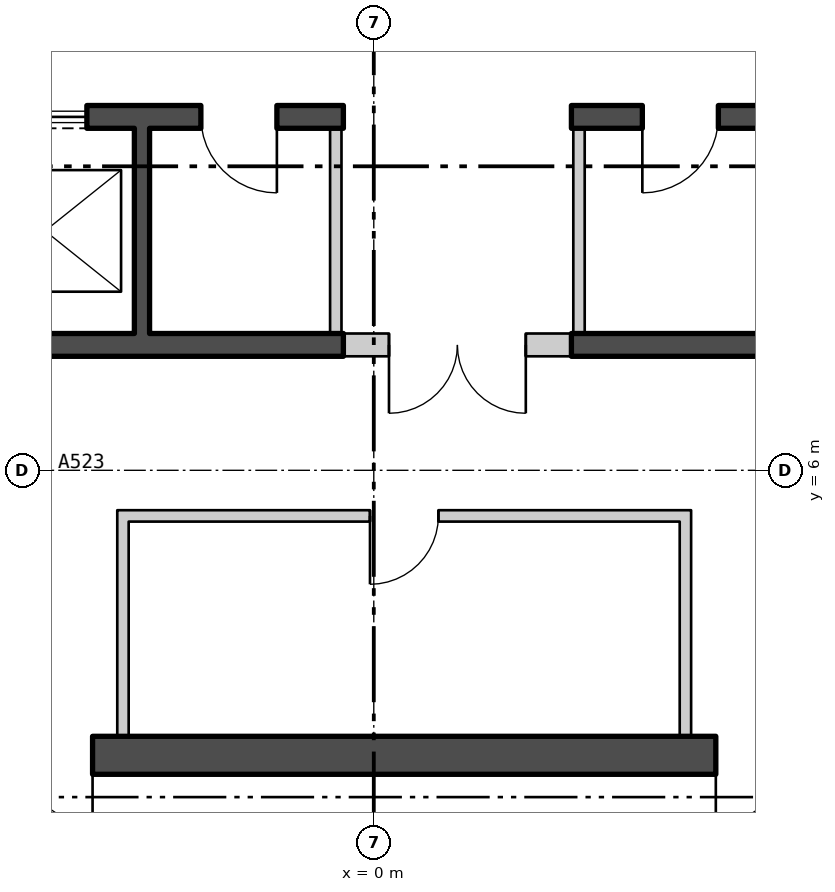
"""IFC4 building model, lengths in metres.
Left out: names, types, materials, properties, quantities, classifications, styles, units other than length and angle.
Written with IfcOpenShell. Run it as: python <this file> out.ifc"""

import sys

from ifc_helpers import new_model, si_unit, direction, frame, frame_2d, origin, place, context, subcontext, project, spatial, polyline, rectangle, outline, extrude, element, fill, save


model = new_model("IFC4")
c1 = context("Model", 3, precision=1e-05, world=origin(), true_north=direction((0.0, 1.0)))
c2 = subcontext(c1, "Body", "Model", "MODEL_VIEW")
j1 = project(units=[si_unit("LENGTHUNIT", "METRE"), si_unit("PLANEANGLEUNIT", "RADIAN")], contexts=[c1])
p1 = place(None, origin())
s1 = spatial("IfcSite", under=j1, at=p1, CompositionType="ELEMENT")
p2 = place(p1, origin())
s2 = spatial("IfcBuilding", under=s1, at=p2, CompositionType="ELEMENT")
p3 = place(p2, frame((0.0, 0.0, 174.9)))
s3 = spatial("IfcBuildingStorey", under=s2, at=p3, CompositionType="ELEMENT", Elevation=174.9)
p4 = place(p3, frame((-26.775, 13.22, -0.18), z_axis=(0.0, 0.0, 1.0), x_axis=(0.500000335318, -0.866025210188, 0.0)))
e1 = element("IfcWall", 1, at=p4, inside=s3, PredefinedType="SOLIDWALL", context=c2, shape_type="SweptSolid", body=[
    extrude(outline(polyline([(-0.13, -0.225), (45.88, -0.225), (45.62, 0.225), (0.13, 0.225), (-0.13, -0.225)])), origin(), (0.0, 0.0, 1.0), 3.68),
])
p5 = place(p4, frame((1.425, 0.0, 1.08)))
e2 = element("IfcOpeningElement", 2, at=p5, cuts=e1, PredefinedType="OPENING", context=c2, shape_type="SweptSolid", body=[
    extrude(rectangle(XDim=2.4, YDim=2.0, at=frame_2d((1.2, 1.0))), frame((0.0, 0.235, 0.0), z_axis=(0.0, -1.0, 0.0), x_axis=(1.0, 0.0, 0.0)), (0.0, 0.0, 1.0), 0.47),
])
p6 = place(p4, frame((5.895, 0.0, 1.08)))
e3 = element("IfcOpeningElement", 3, at=p6, cuts=e1, PredefinedType="OPENING", context=c2, shape_type="SweptSolid", body=[
    extrude(rectangle(XDim=2.4, YDim=2.0, at=frame_2d((1.2, 1.0))), frame((0.0, 0.235, 0.0), z_axis=(0.0, -1.0, 0.0), x_axis=(1.0, 0.0, 0.0)), (0.0, 0.0, 1.0), 0.47),
])
p7 = place(p4, frame((10.403, 0.0, 1.08)))
e4 = element("IfcOpeningElement", 4, at=p7, cuts=e1, PredefinedType="OPENING", context=c2, shape_type="SweptSolid", body=[
    extrude(rectangle(XDim=2.4, YDim=2.0, at=frame_2d((1.2, 1.0))), frame((0.0, 0.235, 0.0), z_axis=(0.0, -1.0, 0.0), x_axis=(1.0, 0.0, 0.0)), (0.0, 0.0, 1.0), 0.47),
])
p8 = place(p4, frame((14.912, 0.0, 1.08)))
e5 = element("IfcOpeningElement", 5, at=p8, cuts=e1, PredefinedType="OPENING", context=c2, shape_type="SweptSolid", body=[
    extrude(rectangle(XDim=2.4, YDim=2.0, at=frame_2d((1.2, 1.0))), frame((0.0, 0.235, 0.0), z_axis=(0.0, -1.0, 0.0), x_axis=(1.0, 0.0, 0.0)), (0.0, 0.0, 1.0), 0.47),
])
p9 = place(p4, frame((19.421, 0.0, 1.08)))
e6 = element("IfcOpeningElement", 6, at=p9, cuts=e1, PredefinedType="OPENING", context=c2, shape_type="SweptSolid", body=[
    extrude(rectangle(XDim=2.4, YDim=2.0, at=frame_2d((1.2, 1.0))), frame((0.0, 0.235, 0.0), z_axis=(0.0, -1.0, 0.0), x_axis=(1.0, 0.0, 0.0)), (0.0, 0.0, 1.0), 0.47),
])
p10 = place(p4, frame((23.929, 0.0, 1.08)))
e7 = element("IfcOpeningElement", 7, at=p10, cuts=e1, PredefinedType="OPENING", context=c2, shape_type="SweptSolid", body=[
    extrude(rectangle(XDim=2.4, YDim=2.0, at=frame_2d((1.2, 1.0))), frame((0.0, 0.235, 0.0), z_axis=(0.0, -1.0, 0.0), x_axis=(1.0, 0.0, 0.0)), (0.0, 0.0, 1.0), 0.47),
])
p11 = place(p4, frame((28.438, 0.0, 1.08)))
e8 = element("IfcOpeningElement", 8, at=p11, cuts=e1, PredefinedType="OPENING", context=c2, shape_type="SweptSolid", body=[
    extrude(rectangle(XDim=2.4, YDim=2.0, at=frame_2d((1.2, 1.0))), frame((0.0, 0.235, 0.0), z_axis=(0.0, -1.0, 0.0), x_axis=(1.0, 0.0, 0.0)), (0.0, 0.0, 1.0), 0.47),
])
p12 = place(p4, frame((32.947, 0.0, 1.08)))
e9 = element("IfcOpeningElement", 9, at=p12, cuts=e1, PredefinedType="OPENING", context=c2, shape_type="SweptSolid", body=[
    extrude(rectangle(XDim=2.4, YDim=2.0, at=frame_2d((1.2, 1.0))), frame((0.0, 0.235, 0.0), z_axis=(0.0, -1.0, 0.0), x_axis=(1.0, 0.0, 0.0)), (0.0, 0.0, 1.0), 0.47),
])
p13 = place(p4, frame((37.455, 0.0, 1.08)))
e10 = element("IfcOpeningElement", 10, at=p13, cuts=e1, PredefinedType="OPENING", context=c2, shape_type="SweptSolid", body=[
    extrude(rectangle(XDim=2.4, YDim=2.0, at=frame_2d((1.2, 1.0))), frame((0.0, 0.235, 0.0), z_axis=(0.0, -1.0, 0.0), x_axis=(1.0, 0.0, 0.0)), (0.0, 0.0, 1.0), 0.47),
])
p14 = place(p4, frame((41.925, 0.0, 1.08)))
e11 = element("IfcOpeningElement", 11, at=p14, cuts=e1, PredefinedType="OPENING", context=c2, shape_type="SweptSolid", body=[
    extrude(rectangle(XDim=2.4, YDim=2.0, at=frame_2d((1.2, 1.0))), frame((0.0, 0.235, 0.0), z_axis=(0.0, -1.0, 0.0), x_axis=(1.0, 0.0, 0.0)), (0.0, 0.0, 1.0), 0.47),
])
p15 = place(p3, frame((3.9, -26.401, -0.18), z_axis=(0.0, 0.0, 1.0), x_axis=(0.500000335318, 0.866025210188, 0.0)))
e12 = element("IfcWall", 12, at=p15, inside=s3, PredefinedType="SOLIDWALL", context=c2, shape_type="SweptSolid", body=[
    extrude(outline(polyline([(-0.13, -0.225), (45.88, -0.225), (45.62, 0.225), (0.13, 0.225), (-0.13, -0.225)])), origin(), (0.0, 0.0, 1.0), 3.68),
])
p16 = place(p15, frame((1.425, 0.0, 1.08)))
e13 = element("IfcOpeningElement", 13, at=p16, cuts=e12, PredefinedType="OPENING", context=c2, shape_type="SweptSolid", body=[
    extrude(rectangle(XDim=2.4, YDim=2.0, at=frame_2d((1.2, 1.0))), frame((0.0, 0.235, 0.0), z_axis=(0.0, -1.0, 0.0), x_axis=(1.0, 0.0, 0.0)), (0.0, 0.0, 1.0), 0.47),
])
p17 = place(p15, frame((5.895, 0.0, 1.08)))
e14 = element("IfcOpeningElement", 14, at=p17, cuts=e12, PredefinedType="OPENING", context=c2, shape_type="SweptSolid", body=[
    extrude(rectangle(XDim=2.4, YDim=2.0, at=frame_2d((1.2, 1.0))), frame((0.0, 0.235, 0.0), z_axis=(0.0, -1.0, 0.0), x_axis=(1.0, 0.0, 0.0)), (0.0, 0.0, 1.0), 0.47),
])
p18 = place(p15, frame((10.403, 0.0, 1.08)))
e15 = element("IfcOpeningElement", 15, at=p18, cuts=e12, PredefinedType="OPENING", context=c2, shape_type="SweptSolid", body=[
    extrude(rectangle(XDim=2.4, YDim=2.0, at=frame_2d((1.2, 1.0))), frame((0.0, 0.235, 0.0), z_axis=(0.0, -1.0, 0.0), x_axis=(1.0, 0.0, 0.0)), (0.0, 0.0, 1.0), 0.47),
])
p19 = place(p15, frame((14.912, 0.0, 1.08)))
e16 = element("IfcOpeningElement", 16, at=p19, cuts=e12, PredefinedType="OPENING", context=c2, shape_type="SweptSolid", body=[
    extrude(rectangle(XDim=2.4, YDim=2.0, at=frame_2d((1.2, 1.0))), frame((0.0, 0.235, 0.0), z_axis=(0.0, -1.0, 0.0), x_axis=(1.0, 0.0, 0.0)), (0.0, 0.0, 1.0), 0.47),
])
p20 = place(p15, frame((19.421, 0.0, 1.08)))
e17 = element("IfcOpeningElement", 17, at=p20, cuts=e12, PredefinedType="OPENING", context=c2, shape_type="SweptSolid", body=[
    extrude(rectangle(XDim=2.4, YDim=2.0, at=frame_2d((1.2, 1.0))), frame((0.0, 0.235, 0.0), z_axis=(0.0, -1.0, 0.0), x_axis=(1.0, 0.0, 0.0)), (0.0, 0.0, 1.0), 0.47),
])
p21 = place(p15, frame((23.929, 0.0, 1.08)))
e18 = element("IfcOpeningElement", 18, at=p21, cuts=e12, PredefinedType="OPENING", context=c2, shape_type="SweptSolid", body=[
    extrude(rectangle(XDim=2.4, YDim=2.0, at=frame_2d((1.2, 1.0))), frame((0.0, 0.235, 0.0), z_axis=(0.0, -1.0, 0.0), x_axis=(1.0, 0.0, 0.0)), (0.0, 0.0, 1.0), 0.47),
])
p22 = place(p15, frame((37.455, 0.0, 1.08)))
e19 = element("IfcOpeningElement", 19, at=p22, cuts=e12, PredefinedType="OPENING", context=c2, shape_type="SweptSolid", body=[
    extrude(rectangle(XDim=2.4, YDim=2.0, at=frame_2d((1.2, 1.0))), frame((0.0, 0.235, 0.0), z_axis=(0.0, -1.0, 0.0), x_axis=(1.0, 0.0, 0.0)), (0.0, 0.0, 1.0), 0.47),
])
p23 = place(p15, frame((41.925, 0.0, 1.08)))
e20 = element("IfcOpeningElement", 20, at=p23, cuts=e12, PredefinedType="OPENING", context=c2, shape_type="SweptSolid", body=[
    extrude(rectangle(XDim=2.4, YDim=2.0, at=frame_2d((1.2, 1.0))), frame((0.0, 0.235, 0.0), z_axis=(0.0, -1.0, 0.0), x_axis=(1.0, 0.0, 0.0)), (0.0, 0.0, 1.0), 0.47),
])
p24 = place(p3, frame((-16.2, 2.25, 0.0), z_axis=(0.0, 0.0, 1.0), x_axis=(1.0, 0.0, 0.0)))
e21 = element("IfcWall", 21, at=p24, inside=s3, PredefinedType="SHEAR", context=c2, shape_type="SweptSolid", body=[
    extrude(rectangle(XDim=32.4, YDim=0.5, at=frame_2d((16.2, 0.0))), origin(), (0.0, 0.0, 1.0), 3.7),
])
p25 = place(p24, frame((10.7, 0.0, 0.0)))
e22 = element("IfcOpeningElement", 22, at=p25, cuts=e21, PredefinedType="OPENING", context=c2, shape_type="SweptSolid", body=[
    extrude(rectangle(XDim=1.8, YDim=2.4, at=frame_2d((0.9, 1.2))), frame((0.0, 0.26, 0.0), z_axis=(0.0, -1.0, 0.0), x_axis=(1.0, 0.0, 0.0)), (0.0, 0.0, 1.0), 0.52),
])
p26 = place(p24, frame((20.7, 0.0, 0.0)))
e23 = element("IfcOpeningElement", 23, at=p26, cuts=e21, PredefinedType="OPENING", context=c2, shape_type="SweptSolid", body=[
    extrude(rectangle(XDim=1.8, YDim=2.4, at=frame_2d((0.9, 1.2))), frame((0.0, 0.26, 0.0), z_axis=(0.0, -1.0, 0.0), x_axis=(1.0, 0.0, 0.0)), (0.0, 0.0, 1.0), 0.52),
])
p27 = place(p3, frame((-10.7, 10.65, 0.0), z_axis=(0.0, 0.0, 1.0), x_axis=(1.0, 0.0, 0.0)))
e24 = element("IfcWall", 24, at=p27, inside=s3, PredefinedType="SHEAR", context=c2, shape_type="SweptSolid", body=[
    extrude(rectangle(XDim=10.3, YDim=0.3, at=frame_2d((5.15, 0.0))), origin(), (0.0, 0.0, 1.0), 3.7),
])
p28 = place(p27, frame((0.675, 0.0, 0.0)))
e25 = element("IfcOpeningElement", 25, at=p28, cuts=e24, PredefinedType="OPENING", context=c2, shape_type="SweptSolid", body=[
    extrude(rectangle(XDim=1.1, YDim=2.1, at=frame_2d((0.55, 1.05))), frame((0.0, 0.16, 0.0), z_axis=(0.0, -1.0, 0.0), x_axis=(1.0, 0.0, 0.0)), (0.0, 0.0, 1.0), 0.32),
])
p29 = place(p27, frame((3.275, 0.0, 0.0)))
e26 = element("IfcOpeningElement", 26, at=p29, cuts=e24, PredefinedType="OPENING", context=c2, shape_type="SweptSolid", body=[
    extrude(rectangle(XDim=1.1, YDim=2.1, at=frame_2d((0.55, 1.05))), frame((0.0, 0.16, 0.0), z_axis=(0.0, -1.0, 0.0), x_axis=(1.0, 0.0, 0.0)), (0.0, 0.0, 1.0), 0.32),
])
p30 = place(p27, frame((5.825, 0.0, 0.0)))
e27 = element("IfcOpeningElement", 27, at=p30, cuts=e24, PredefinedType="OPENING", context=c2, shape_type="SweptSolid", body=[
    extrude(rectangle(XDim=1.1, YDim=2.1, at=frame_2d((0.55, 1.05))), frame((0.0, 0.16, 0.0), z_axis=(0.0, -1.0, 0.0), x_axis=(1.0, 0.0, 0.0)), (0.0, 0.0, 1.0), 0.32),
])
p31 = place(p27, frame((8.425, 0.0, 0.0)))
e28 = element("IfcOpeningElement", 28, at=p31, cuts=e24, PredefinedType="OPENING", context=c2, shape_type="SweptSolid", body=[
    extrude(rectangle(XDim=1.0, YDim=2.1, at=frame_2d((0.5, 1.05))), frame((0.0, 0.16, 0.0), z_axis=(0.0, -1.0, 0.0), x_axis=(1.0, 0.0, 0.0)), (0.0, 0.0, 1.0), 0.32),
])
p32 = place(p3, frame((-10.7, 7.65, 0.0), z_axis=(0.0, 0.0, 1.0), x_axis=(1.0, 0.0, 0.0)))
e29 = element("IfcWall", 29, at=p32, inside=s3, PredefinedType="SHEAR", context=c2, shape_type="SweptSolid", body=[
    extrude(rectangle(XDim=10.3, YDim=0.3, at=frame_2d((5.15, 0.0))), origin(), (0.0, 0.0, 1.0), 3.7),
])
p33 = place(p3, frame((2.6, 10.65, 0.0), z_axis=(0.0, 0.0, 1.0), x_axis=(1.0, 0.0, 0.0)))
e30 = element("IfcWall", 30, at=p33, inside=s3, PredefinedType="SHEAR", context=c2, shape_type="SweptSolid", body=[
    extrude(rectangle(XDim=8.1, YDim=0.3, at=frame_2d((4.05, 0.0))), origin(), (0.0, 0.0, 1.0), 3.7),
])
p34 = place(p33, frame((0.933, 0.0, 0.0)))
e31 = element("IfcOpeningElement", 31, at=p34, cuts=e30, PredefinedType="OPENING", context=c2, shape_type="SweptSolid", body=[
    extrude(rectangle(XDim=1.0, YDim=2.1, at=frame_2d((0.5, 1.05))), frame((0.0, 0.16, 0.0), z_axis=(0.0, -1.0, 0.0), x_axis=(1.0, 0.0, 0.0)), (0.0, 0.0, 1.0), 0.32),
])
p35 = place(p3, frame((2.6, 7.65, 0.0), z_axis=(0.0, 0.0, 1.0), x_axis=(1.0, 0.0, 0.0)))
e32 = element("IfcWall", 32, at=p35, inside=s3, PredefinedType="SHEAR", context=c2, shape_type="SweptSolid", body=[
    extrude(rectangle(XDim=8.1, YDim=0.3, at=frame_2d((4.05, 0.0))), origin(), (0.0, 0.0, 1.0), 3.7),
])
p36 = place(p3, frame((-3.05, 7.8, 0.0), z_axis=(0.0, 0.0, 1.0), x_axis=(0.0, 1.0, 0.0)))
e33 = element("IfcWall", 33, at=p36, inside=s3, PredefinedType="SHEAR", context=c2, shape_type="SweptSolid", body=[
    extrude(rectangle(XDim=2.7, YDim=0.2, at=frame_2d((1.35, 0.0))), origin(), (0.0, 0.0, 1.0), 3.7),
])
for number, where, z_axis, x_axis in (
    (34, (-0.5, 7.8, 0.0), (0.0, 0.0, 1.0), (0.0, 1.0, 0.0)),
    (35, (2.7, 7.8, 0.0), (0.0, 0.0, 1.0), (0.0, 1.0, 0.0)),
):
    element("IfcWall", number, at=place(p3, frame(where, z_axis=z_axis, x_axis=x_axis)), inside=s3, PredefinedType="PARTITIONING", context=c2, shape_type="SweptSolid", body=[
        extrude(rectangle(XDim=2.7, YDim=0.15, at=frame_2d((1.35, 0.0))), origin(), (0.0, 0.0, 1.0), 3.7),
    ])
for number, where, z_axis, x_axis in (
    (36, (-3.3, 2.5, 0.0), (0.0, 0.0, 1.0), (0.0, 1.0, 0.0)),
    (37, (4.1, 2.5, 0.0), (0.0, 0.0, 1.0), (0.0, 1.0, 0.0)),
):
    element("IfcWall", number, at=place(p3, frame(where, z_axis=z_axis, x_axis=x_axis)), inside=s3, PredefinedType="PARTITIONING", context=c2, shape_type="SweptSolid", body=[
        extrude(rectangle(XDim=2.975, YDim=0.15, at=frame_2d((1.488, 0.0))), origin(), (0.0, 0.0, 1.0), 3.7),
    ])
p37 = place(p3, frame((-3.225, 5.4, 0.0), z_axis=(0.0, 0.0, 1.0), x_axis=(1.0, 0.0, 0.0)))
e38 = element("IfcWall", 38, at=p37, inside=s3, PredefinedType="PARTITIONING", context=c2, shape_type="SweptSolid", body=[
    extrude(rectangle(XDim=7.25, YDim=0.15, at=frame_2d((3.625, 0.0))), origin(), (0.0, 0.0, 1.0), 3.7),
])
p38 = place(p37, frame((3.175, 0.0, 0.0)))
e39 = element("IfcOpeningElement", 39, at=p38, cuts=e38, PredefinedType="OPENING", context=c2, shape_type="SweptSolid", body=[
    extrude(rectangle(XDim=0.9, YDim=2.1, at=frame_2d((0.45, 1.05))), frame((0.0, 0.085, 0.0), z_axis=(0.0, -1.0, 0.0), x_axis=(1.0, 0.0, 0.0)), (0.0, 0.0, 1.0), 0.17),
])
p39 = place(p3, frame((-0.4, 7.65, 0.0), z_axis=(0.0, 0.0, 1.0), x_axis=(1.0, 0.0, 0.0)))
e40 = element("IfcWall", 40, at=p39, inside=s3, PredefinedType="PARTITIONING", context=c2, shape_type="SweptSolid", body=[
    extrude(rectangle(XDim=3.0, YDim=0.3, at=frame_2d((1.5, 0.0))), origin(), (0.0, 0.0, 1.0), 3.7),
])
p40 = place(p39, frame((0.6, 0.0, 0.0)))
e41 = element("IfcOpeningElement", 41, at=p40, cuts=e40, PredefinedType="OPENING", context=c2, shape_type="SweptSolid", body=[
    extrude(rectangle(XDim=1.8, YDim=2.4, at=frame_2d((0.9, 1.2))), frame((0.0, 0.16, 0.0), z_axis=(0.0, -1.0, 0.0), x_axis=(1.0, 0.0, 0.0)), (0.0, 0.0, 1.0), 0.32),
])
p41 = place(p30, origin())
e42 = element("IfcDoor", 42, at=p41, inside=s3, OperationType="SLIDING_TO_LEFT", PredefinedType="DOOR", context=c2, shape_type="SweptSolid", body=[
    extrude(rectangle(XDim=1.1, YDim=2.1, at=frame_2d((0.55, 1.05))), frame((0.0, 0.025, 0.0), z_axis=(0.0, -1.0, 0.0), x_axis=(1.0, 0.0, 0.0)), (0.0, 0.0, 1.0), 0.05),
])
fill(e27, e42)
p42 = place(p31, origin())
e43 = element("IfcDoor", 43, at=p42, inside=s3, OperationType="SINGLE_SWING_RIGHT", PredefinedType="DOOR", context=c2, shape_type="SweptSolid", body=[
    extrude(rectangle(XDim=1.0, YDim=2.1, at=frame_2d((0.5, 1.05))), frame((0.0, 0.025, 0.0), z_axis=(0.0, -1.0, 0.0), x_axis=(1.0, 0.0, 0.0)), (0.0, 0.0, 1.0), 0.05),
])
fill(e28, e43)
p43 = place(p34, origin())
e44 = element("IfcDoor", 44, at=p43, inside=s3, OperationType="SINGLE_SWING_LEFT", PredefinedType="DOOR", context=c2, shape_type="SweptSolid", body=[
    extrude(rectangle(XDim=1.0, YDim=2.1, at=frame_2d((0.5, 1.05))), frame((0.0, 0.025, 0.0), z_axis=(0.0, -1.0, 0.0), x_axis=(1.0, 0.0, 0.0)), (0.0, 0.0, 1.0), 0.05),
])
fill(e31, e44)
p44 = place(p38, origin())
e45 = element("IfcDoor", 45, at=p44, inside=s3, OperationType="SINGLE_SWING_LEFT", PredefinedType="DOOR", context=c2, shape_type="SweptSolid", body=[
    extrude(rectangle(XDim=0.9, YDim=2.1, at=frame_2d((0.45, 1.05))), frame((0.0, 0.025, 0.0), z_axis=(0.0, -1.0, 0.0), x_axis=(1.0, 0.0, 0.0)), (0.0, 0.0, 1.0), 0.05),
])
fill(e39, e45)
p45 = place(p40, origin())
e46 = element("IfcDoor", 46, at=p45, inside=s3, OperationType="DOUBLE_DOOR_SINGLE_SWING", PredefinedType="DOOR", context=c2, shape_type="SweptSolid", body=[
    extrude(rectangle(XDim=1.8, YDim=2.4, at=frame_2d((0.9, 1.2))), frame((0.0, 0.025, 0.0), z_axis=(0.0, -1.0, 0.0), x_axis=(1.0, 0.0, 0.0)), (0.0, 0.0, 1.0), 0.05),
])
fill(e41, e46)
p46 = place(p25, origin())
e47 = element("IfcDoor", 47, at=p46, inside=s3, OperationType="DOUBLE_DOOR_SINGLE_SWING", PredefinedType="DOOR", context=c2, shape_type="SweptSolid", body=[
    extrude(rectangle(XDim=1.8, YDim=2.4, at=frame_2d((0.9, 1.2))), frame((0.0, 0.025, 0.0), z_axis=(0.0, -1.0, 0.0), x_axis=(1.0, 0.0, 0.0)), (0.0, 0.0, 1.0), 0.05),
])
fill(e22, e47)
p47 = place(p26, origin())
e48 = element("IfcDoor", 48, at=p47, inside=s3, OperationType="DOUBLE_DOOR_SINGLE_SWING", PredefinedType="DOOR", context=c2, shape_type="SweptSolid", body=[
    extrude(rectangle(XDim=1.8, YDim=2.4, at=frame_2d((0.9, 1.2))), frame((0.0, 0.025, 0.0), z_axis=(0.0, -1.0, 0.0), x_axis=(1.0, 0.0, 0.0)), (0.0, 0.0, 1.0), 0.05),
])
fill(e23, e48)
save(model, sys.argv[1])
